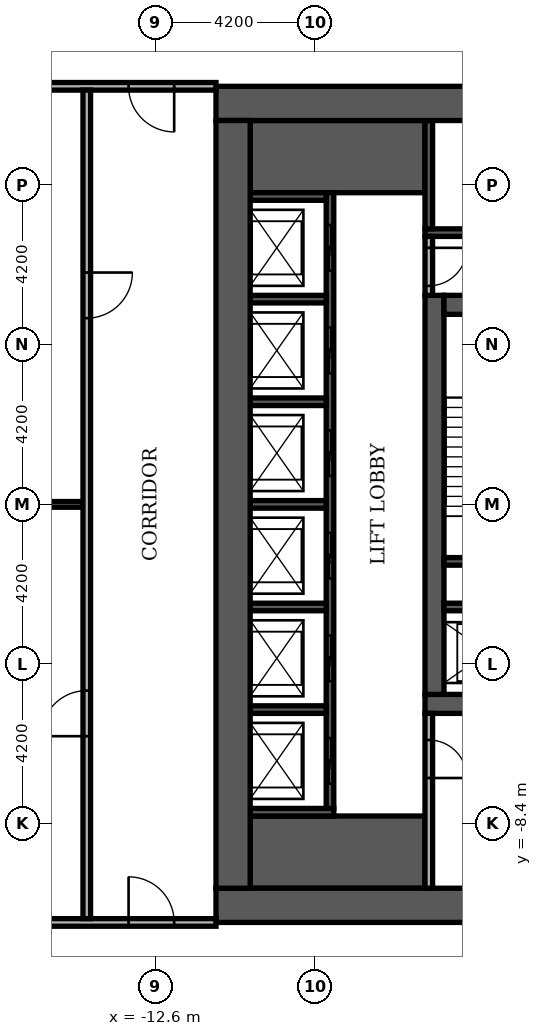
"""IFC4 building model, lengths in metres.
Left out: names, types, materials, properties, quantities, classifications, styles, units other than length and angle.
Written with IfcOpenShell. Run it as: python <this file> out.ifc"""

import sys

from ifc_helpers import new_model, si_unit, direction, frame, frame_2d, origin, place, context, subcontext, project, spatial, rectangle, extrude, element, fill, save


model = new_model("IFC4")
c1 = context("Model", 3, precision=1e-05, world=origin(), true_north=direction((0.0, 1.0)))
c2 = subcontext(c1, "Body", "Model", "MODEL_VIEW")
j1 = project(units=[si_unit("LENGTHUNIT", "METRE"), si_unit("PLANEANGLEUNIT", "RADIAN")], contexts=[c1])
p1 = place(None, origin())
s1 = spatial("IfcSite", under=j1, at=p1, CompositionType="ELEMENT")
p2 = place(p1, origin())
s2 = spatial("IfcBuilding", under=s1, at=p2, CompositionType="ELEMENT")
p3 = place(p2, frame((0.0, 0.0, -8.4)))
s3 = spatial("IfcBuildingStorey", under=s2, at=p3, CompositionType="ELEMENT", Elevation=-8.4)
p4 = place(p3, frame((-5.5, -5.25, 0.0), z_axis=(0.0, 0.0, 1.0), x_axis=(1.0, 0.0, 0.0)))
e1 = element("IfcWall", 1, at=p4, inside=s3, PredefinedType="SHEAR", context=c2, shape_type="SweptSolid", body=[
    extrude(rectangle(XDim=11.0, YDim=0.5, at=frame_2d((5.5, 0.0))), origin(), (0.0, 0.0, 1.0), 3.85),
])
p5 = place(p4, frame((4.9, 0.0, 0.0)))
e2 = element("IfcOpeningElement", 2, at=p5, cuts=e1, PredefinedType="OPENING", context=c2, shape_type="SweptSolid", body=[
    extrude(rectangle(XDim=1.2, YDim=2.1, at=frame_2d((0.6, 1.05))), frame((0.0, 0.26, 0.0), z_axis=(0.0, -1.0, 0.0), x_axis=(1.0, 0.0, 0.0)), (0.0, 0.0, 1.0), 0.52),
])
p6 = place(p3, frame((-5.25, -5.0, 0.0), z_axis=(0.0, 0.0, 1.0), x_axis=(0.0, 1.0, 0.0)))
e3 = element("IfcWall", 3, at=p6, inside=s3, PredefinedType="SHEAR", context=c2, shape_type="SweptSolid", body=[
    extrude(rectangle(XDim=10.5, YDim=0.5, at=frame_2d((5.25, 0.0))), origin(), (0.0, 0.0, 1.0), 3.85),
])
p7 = place(p3, frame((-5.0, 5.25, 0.0), z_axis=(0.0, 0.0, 1.0), x_axis=(1.0, 0.0, 0.0)))
e4 = element("IfcWall", 4, at=p7, inside=s3, PredefinedType="SHEAR", context=c2, shape_type="SweptSolid", body=[
    extrude(rectangle(XDim=10.0, YDim=0.5, at=frame_2d((5.0, 0.0))), origin(), (0.0, 0.0, 1.0), 3.85),
])
p8 = place(p7, frame((4.4, 0.0, 0.0)))
e5 = element("IfcOpeningElement", 5, at=p8, cuts=e4, PredefinedType="OPENING", context=c2, shape_type="SweptSolid", body=[
    extrude(rectangle(XDim=1.2, YDim=2.1, at=frame_2d((0.6, 1.05))), frame((0.0, 0.26, 0.0), z_axis=(0.0, -1.0, 0.0), x_axis=(1.0, 0.0, 0.0)), (0.0, 0.0, 1.0), 0.52),
])
for number, where, z_axis, x_axis in (
    (6, (-10.1, -9.15, 0.0), (0.0, 0.0, 1.0), (1.0, 0.0, 0.0)),
    (7, (-10.1, 9.15, 0.0), (0.0, 0.0, 1.0), (1.0, 0.0, 0.0)),
):
    element("IfcWall", number, at=place(p3, frame(where, z_axis=z_axis, x_axis=x_axis)), inside=s3, PredefinedType="SHEAR", context=c2, shape_type="SweptSolid", body=[
        extrude(rectangle(XDim=4.6, YDim=1.9, at=frame_2d((2.3, 0.0))), origin(), (0.0, 0.0, 1.0), 3.85),
    ])
p9 = place(p3, frame((-5.0, -1.5, 0.0), z_axis=(0.0, 0.0, 1.0), x_axis=(1.0, 0.0, 0.0)))
e8 = element("IfcWall", 8, at=p9, inside=s3, PredefinedType="SHEAR", context=c2, shape_type="SweptSolid", body=[
    extrude(rectangle(XDim=3.05, YDim=0.2, at=frame_2d((1.525, 0.0))), origin(), (0.0, 0.0, 1.0), 3.85),
])
p10 = place(p3, frame((-5.5, 7.15, 0.0), z_axis=(0.0, 0.0, 1.0), x_axis=(1.0, 0.0, 0.0)))
e9 = element("IfcWall", 9, at=p10, inside=s3, PredefinedType="SHEAR", context=c2, shape_type="SweptSolid", body=[
    extrude(rectangle(XDim=6.8, YDim=0.2, at=frame_2d((3.4, 0.0))), origin(), (0.0, 0.0, 1.0), 3.85),
])
p11 = place(p3, frame((-5.4, 7.25, 0.0), z_axis=(0.0, 0.0, 1.0), x_axis=(0.0, 1.0, 0.0)))
e10 = element("IfcWall", 10, at=p11, inside=s3, PredefinedType="SHEAR", context=c2, shape_type="SweptSolid", body=[
    extrude(rectangle(XDim=2.85, YDim=0.2, at=frame_2d((1.425, 0.0))), origin(), (0.0, 0.0, 1.0), 3.85),
])
p12 = place(p3, frame((-10.1, -8.1, 0.0), z_axis=(0.0, 0.0, 1.0), x_axis=(1.0, 0.0, 0.0)))
e11 = element("IfcWall", 11, at=p12, inside=s3, PredefinedType="SHEAR", context=c2, shape_type="SweptSolid", body=[
    extrude(rectangle(XDim=2.2, YDim=0.2, at=frame_2d((1.1, 0.0))), origin(), (0.0, 0.0, 1.0), 3.85),
])
p13 = place(p3, frame((-8.0, -8.0, 0.0), z_axis=(0.0, 0.0, 1.0), x_axis=(0.0, 1.0, 0.0)))
e12 = element("IfcWall", 12, at=p13, inside=s3, PredefinedType="SHEAR", context=c2, shape_type="SweptSolid", body=[
    extrude(rectangle(XDim=16.2, YDim=0.2, at=frame_2d((8.1, 0.0))), origin(), (0.0, 0.0, 1.0), 3.85),
])
p14 = place(p13, frame((0.65, 0.0, 0.0)))
e13 = element("IfcOpeningElement", 13, at=p14, cuts=e12, PredefinedType="OPENING", context=c2, shape_type="SweptSolid", body=[
    extrude(rectangle(XDim=1.2, YDim=2.1, at=frame_2d((0.6, 1.05))), frame((0.0, 0.11, 0.0), z_axis=(0.0, -1.0, 0.0), x_axis=(1.0, 0.0, 0.0)), (0.0, 0.0, 1.0), 0.22),
])
p15 = place(p13, frame((3.35, 0.0, 0.0)))
e14 = element("IfcOpeningElement", 14, at=p15, cuts=e12, PredefinedType="OPENING", context=c2, shape_type="SweptSolid", body=[
    extrude(rectangle(XDim=1.2, YDim=2.1, at=frame_2d((0.6, 1.05))), frame((0.0, 0.11, 0.0), z_axis=(0.0, -1.0, 0.0), x_axis=(1.0, 0.0, 0.0)), (0.0, 0.0, 1.0), 0.22),
])
p16 = place(p13, frame((6.05, 0.0, 0.0)))
e15 = element("IfcOpeningElement", 15, at=p16, cuts=e12, PredefinedType="OPENING", context=c2, shape_type="SweptSolid", body=[
    extrude(rectangle(XDim=1.2, YDim=2.1, at=frame_2d((0.6, 1.05))), frame((0.0, 0.11, 0.0), z_axis=(0.0, -1.0, 0.0), x_axis=(1.0, 0.0, 0.0)), (0.0, 0.0, 1.0), 0.22),
])
p17 = place(p13, frame((8.75, 0.0, 0.0)))
e16 = element("IfcOpeningElement", 16, at=p17, cuts=e12, PredefinedType="OPENING", context=c2, shape_type="SweptSolid", body=[
    extrude(rectangle(XDim=1.2, YDim=2.1, at=frame_2d((0.6, 1.05))), frame((0.0, 0.11, 0.0), z_axis=(0.0, -1.0, 0.0), x_axis=(1.0, 0.0, 0.0)), (0.0, 0.0, 1.0), 0.22),
])
p18 = place(p13, frame((11.45, 0.0, 0.0)))
e17 = element("IfcOpeningElement", 17, at=p18, cuts=e12, PredefinedType="OPENING", context=c2, shape_type="SweptSolid", body=[
    extrude(rectangle(XDim=1.2, YDim=2.1, at=frame_2d((0.6, 1.05))), frame((0.0, 0.11, 0.0), z_axis=(0.0, -1.0, 0.0), x_axis=(1.0, 0.0, 0.0)), (0.0, 0.0, 1.0), 0.22),
])
p19 = place(p13, frame((14.15, 0.0, 0.0)))
e18 = element("IfcOpeningElement", 18, at=p19, cuts=e12, PredefinedType="OPENING", context=c2, shape_type="SweptSolid", body=[
    extrude(rectangle(XDim=1.2, YDim=2.1, at=frame_2d((0.6, 1.05))), frame((0.0, 0.11, 0.0), z_axis=(0.0, -1.0, 0.0), x_axis=(1.0, 0.0, 0.0)), (0.0, 0.0, 1.0), 0.22),
])
for number, where, z_axis, x_axis in (
    (19, (-10.1, -5.4, 0.0), (0.0, 0.0, 1.0), (1.0, 0.0, 0.0)),
    (20, (-10.1, -2.7, 0.0), (0.0, 0.0, 1.0), (1.0, 0.0, 0.0)),
):
    element("IfcWall", number, at=place(p3, frame(where, z_axis=z_axis, x_axis=x_axis)), inside=s3, PredefinedType="SHEAR", context=c2, shape_type="SweptSolid", body=[
        extrude(rectangle(XDim=2.0, YDim=0.2, at=frame_2d((1.0, 0.0))), origin(), (0.0, 0.0, 1.0), 3.85),
    ])
p20 = place(p3, frame((-5.0, -2.7, 0.0), z_axis=(0.0, 0.0, 1.0), x_axis=(1.0, 0.0, 0.0)))
e21 = element("IfcWall", 21, at=p20, inside=s3, PredefinedType="SHEAR", context=c2, shape_type="SweptSolid", body=[
    extrude(rectangle(XDim=2.85, YDim=0.2, at=frame_2d((1.425, 0.0))), origin(), (0.0, 0.0, 1.0), 3.85),
])
for number, where, z_axis, x_axis in (
    (22, (-10.1, 0.0, 0.0), (0.0, 0.0, 1.0), (1.0, 0.0, 0.0)),
    (23, (-10.1, 2.7, 0.0), (0.0, 0.0, 1.0), (1.0, 0.0, 0.0)),
    (24, (-10.1, 5.4, 0.0), (0.0, 0.0, 1.0), (1.0, 0.0, 0.0)),
    (25, (-10.1, 8.1, 0.0), (0.0, 0.0, 1.0), (1.0, 0.0, 0.0)),
):
    element("IfcWall", number, at=place(p3, frame(where, z_axis=z_axis, x_axis=x_axis)), inside=s3, PredefinedType="SHEAR", context=c2, shape_type="SweptSolid", body=[
        extrude(rectangle(XDim=2.0, YDim=0.2, at=frame_2d((1.0, 0.0))), origin(), (0.0, 0.0, 1.0), 3.85),
    ])
p21 = place(p3, frame((-11.0, -10.55, 0.0), z_axis=(0.0, 0.0, 1.0), x_axis=(1.0, 0.0, 0.0)))
e26 = element("IfcWall", 26, at=p21, inside=s3, PredefinedType="SHEAR", context=c2, shape_type="SweptSolid", body=[
    extrude(rectangle(XDim=22.0, YDim=0.9, at=frame_2d((11.0, 0.0))), origin(), (0.0, 0.0, 1.0), 3.85),
])
p22 = place(p21, frame((7.4, 0.0, 0.0)))
e27 = element("IfcOpeningElement", 27, at=p22, cuts=e26, PredefinedType="OPENING", context=c2, shape_type="SweptSolid", body=[
    extrude(rectangle(XDim=1.8, YDim=2.2, at=frame_2d((0.9, 1.1))), frame((0.0, 0.46, 0.0), z_axis=(0.0, -1.0, 0.0), x_axis=(1.0, 0.0, 0.0)), (0.0, 0.0, 1.0), 0.92),
])
p23 = place(p3, frame((-11.0, 10.55, 0.0), z_axis=(0.0, 0.0, 1.0), x_axis=(1.0, 0.0, 0.0)))
e28 = element("IfcWall", 28, at=p23, inside=s3, PredefinedType="SHEAR", context=c2, shape_type="SweptSolid", body=[
    extrude(rectangle(XDim=22.0, YDim=0.9, at=frame_2d((11.0, 0.0))), origin(), (0.0, 0.0, 1.0), 3.85),
])
p24 = place(p23, frame((13.3, 0.0, 0.0)))
e29 = element("IfcOpeningElement", 29, at=p24, cuts=e28, PredefinedType="OPENING", context=c2, shape_type="SweptSolid", body=[
    extrude(rectangle(XDim=1.8, YDim=2.2, at=frame_2d((0.9, 1.1))), frame((0.0, 0.46, 0.0), z_axis=(0.0, -1.0, 0.0), x_axis=(1.0, 0.0, 0.0)), (0.0, 0.0, 1.0), 0.92),
])
p25 = place(p3, frame((-10.55, -10.1, 0.0), z_axis=(0.0, 0.0, 1.0), x_axis=(0.0, 1.0, 0.0)))
e30 = element("IfcWall", 30, at=p25, inside=s3, PredefinedType="SHEAR", context=c2, shape_type="SweptSolid", body=[
    extrude(rectangle(XDim=20.2, YDim=0.9, at=frame_2d((10.1, 0.0))), origin(), (0.0, 0.0, 1.0), 3.85),
])
p26 = place(p3, frame((-5.4, -10.1, 0.0), z_axis=(0.0, 0.0, 1.0), x_axis=(0.0, 1.0, 0.0)))
e31 = element("IfcWall", 31, at=p26, inside=s3, PredefinedType="PARTITIONING", context=c2, shape_type="SweptSolid", body=[
    extrude(rectangle(XDim=4.6, YDim=0.2, at=frame_2d((2.3, 0.0))), origin(), (0.0, 0.0, 1.0), 3.85),
])
p27 = place(p26, frame((2.9, 0.0, 0.0)))
e32 = element("IfcOpeningElement", 32, at=p27, cuts=e31, PredefinedType="OPENING", context=c2, shape_type="SweptSolid", body=[
    extrude(rectangle(XDim=1.0, YDim=2.1, at=frame_2d((0.5, 1.05))), frame((0.0, 0.11, 0.0), z_axis=(0.0, -1.0, 0.0), x_axis=(1.0, 0.0, 0.0)), (0.0, 0.0, 1.0), 0.22),
])
p28 = place(p3, frame((-5.4, 5.5, 0.0), z_axis=(0.0, 0.0, 1.0), x_axis=(0.0, 1.0, 0.0)))
e33 = element("IfcWall", 33, at=p28, inside=s3, PredefinedType="PARTITIONING", context=c2, shape_type="SweptSolid", body=[
    extrude(rectangle(XDim=1.55, YDim=0.2, at=frame_2d((0.775, 0.0))), origin(), (0.0, 0.0, 1.0), 3.85),
])
p29 = place(p28, frame((0.25, 0.0, 0.0)))
e34 = element("IfcOpeningElement", 34, at=p29, cuts=e33, PredefinedType="OPENING", context=c2, shape_type="SweptSolid", body=[
    extrude(rectangle(XDim=1.0, YDim=2.1, at=frame_2d((0.5, 1.05))), frame((0.0, 0.11, 0.0), z_axis=(0.0, -1.0, 0.0), x_axis=(1.0, 0.0, 0.0)), (0.0, 0.0, 1.0), 0.22),
])
p30 = place(p3, frame((-25.3, -11.0, 0.0), z_axis=(0.0, 0.0, 1.0), x_axis=(1.0, 0.0, 0.0)))
e35 = element("IfcWall", 35, at=p30, inside=s3, PredefinedType="PARTITIONING", context=c2, shape_type="SweptSolid", body=[
    extrude(rectangle(XDim=14.3, YDim=0.2, at=frame_2d((7.15, 0.0))), origin(), (0.0, 0.0, 1.0), 3.85),
])
p31 = place(p30, frame((12.0, 0.0, 0.0)))
e36 = element("IfcOpeningElement", 36, at=p31, cuts=e35, PredefinedType="OPENING", context=c2, shape_type="SweptSolid", body=[
    extrude(rectangle(XDim=1.2, YDim=2.2, at=frame_2d((0.6, 1.1))), frame((0.0, 0.11, 0.0), z_axis=(0.0, -1.0, 0.0), x_axis=(1.0, 0.0, 0.0)), (0.0, 0.0, 1.0), 0.22),
])
p32 = place(p3, frame((-16.2, 0.0, 0.0), z_axis=(0.0, 0.0, 1.0), x_axis=(1.0, 0.0, 0.0)))
e37 = element("IfcWall", 37, at=p32, inside=s3, PredefinedType="PARTITIONING", context=c2, shape_type="SweptSolid", body=[
    extrude(rectangle(XDim=1.7, YDim=0.15, at=frame_2d((0.85, 0.0))), origin(), (0.0, 0.0, 1.0), 3.85),
])
p33 = place(p3, frame((-25.3, 11.0, 0.0), z_axis=(0.0, 0.0, 1.0), x_axis=(1.0, 0.0, 0.0)))
e38 = element("IfcWall", 38, at=p33, inside=s3, PredefinedType="PARTITIONING", context=c2, shape_type="SweptSolid", body=[
    extrude(rectangle(XDim=14.3, YDim=0.2, at=frame_2d((7.15, 0.0))), origin(), (0.0, 0.0, 1.0), 3.85),
])
p34 = place(p33, frame((12.0, 0.0, 0.0)))
e39 = element("IfcOpeningElement", 39, at=p34, cuts=e38, PredefinedType="OPENING", context=c2, shape_type="SweptSolid", body=[
    extrude(rectangle(XDim=1.2, YDim=2.2, at=frame_2d((0.6, 1.1))), frame((0.0, 0.11, 0.0), z_axis=(0.0, -1.0, 0.0), x_axis=(1.0, 0.0, 0.0)), (0.0, 0.0, 1.0), 0.22),
])
p35 = place(p3, frame((-14.4, -10.9, 0.0), z_axis=(0.0, 0.0, 1.0), x_axis=(0.0, 1.0, 0.0)))
e40 = element("IfcWall", 40, at=p35, inside=s3, PredefinedType="PARTITIONING", context=c2, shape_type="SweptSolid", body=[
    extrude(rectangle(XDim=21.8, YDim=0.2, at=frame_2d((10.9, 0.0))), origin(), (0.0, 0.0, 1.0), 3.85),
])
p36 = place(p35, frame((4.8, 0.0, 0.0)))
e41 = element("IfcOpeningElement", 41, at=p36, cuts=e40, PredefinedType="OPENING", context=c2, shape_type="SweptSolid", body=[
    extrude(rectangle(XDim=1.2, YDim=2.2, at=frame_2d((0.6, 1.1))), frame((0.0, 0.11, 0.0), z_axis=(0.0, -1.0, 0.0), x_axis=(1.0, 0.0, 0.0)), (0.0, 0.0, 1.0), 0.22),
])
p37 = place(p35, frame((15.8, 0.0, 0.0)))
e42 = element("IfcOpeningElement", 42, at=p37, cuts=e40, PredefinedType="OPENING", context=c2, shape_type="SweptSolid", body=[
    extrude(rectangle(XDim=1.2, YDim=2.2, at=frame_2d((0.6, 1.1))), frame((0.0, 0.11, 0.0), z_axis=(0.0, -1.0, 0.0), x_axis=(1.0, 0.0, 0.0)), (0.0, 0.0, 1.0), 0.22),
])
p38 = place(p14, origin())
e43 = element("IfcDoor", 43, at=p38, inside=s3, OperationType="SLIDING_TO_LEFT", PredefinedType="DOOR", context=c2, shape_type="SweptSolid", body=[
    extrude(rectangle(XDim=1.2, YDim=2.1, at=frame_2d((0.6, 1.05))), frame((0.0, 0.025, 0.0), z_axis=(0.0, -1.0, 0.0), x_axis=(1.0, 0.0, 0.0)), (0.0, 0.0, 1.0), 0.05),
])
fill(e13, e43)
p39 = place(p15, origin())
e44 = element("IfcDoor", 44, at=p39, inside=s3, OperationType="SLIDING_TO_LEFT", PredefinedType="DOOR", context=c2, shape_type="SweptSolid", body=[
    extrude(rectangle(XDim=1.2, YDim=2.1, at=frame_2d((0.6, 1.05))), frame((0.0, 0.025, 0.0), z_axis=(0.0, -1.0, 0.0), x_axis=(1.0, 0.0, 0.0)), (0.0, 0.0, 1.0), 0.05),
])
fill(e14, e44)
p40 = place(p16, origin())
e45 = element("IfcDoor", 45, at=p40, inside=s3, OperationType="SLIDING_TO_LEFT", PredefinedType="DOOR", context=c2, shape_type="SweptSolid", body=[
    extrude(rectangle(XDim=1.2, YDim=2.1, at=frame_2d((0.6, 1.05))), frame((0.0, 0.025, 0.0), z_axis=(0.0, -1.0, 0.0), x_axis=(1.0, 0.0, 0.0)), (0.0, 0.0, 1.0), 0.05),
])
fill(e15, e45)
p41 = place(p17, origin())
e46 = element("IfcDoor", 46, at=p41, inside=s3, OperationType="SLIDING_TO_LEFT", PredefinedType="DOOR", context=c2, shape_type="SweptSolid", body=[
    extrude(rectangle(XDim=1.2, YDim=2.1, at=frame_2d((0.6, 1.05))), frame((0.0, 0.025, 0.0), z_axis=(0.0, -1.0, 0.0), x_axis=(1.0, 0.0, 0.0)), (0.0, 0.0, 1.0), 0.05),
])
fill(e16, e46)
p42 = place(p18, origin())
e47 = element("IfcDoor", 47, at=p42, inside=s3, OperationType="SLIDING_TO_LEFT", PredefinedType="DOOR", context=c2, shape_type="SweptSolid", body=[
    extrude(rectangle(XDim=1.2, YDim=2.1, at=frame_2d((0.6, 1.05))), frame((0.0, 0.025, 0.0), z_axis=(0.0, -1.0, 0.0), x_axis=(1.0, 0.0, 0.0)), (0.0, 0.0, 1.0), 0.05),
])
fill(e17, e47)
p43 = place(p19, origin())
e48 = element("IfcDoor", 48, at=p43, inside=s3, OperationType="SLIDING_TO_LEFT", PredefinedType="DOOR", context=c2, shape_type="SweptSolid", body=[
    extrude(rectangle(XDim=1.2, YDim=2.1, at=frame_2d((0.6, 1.05))), frame((0.0, 0.025, 0.0), z_axis=(0.0, -1.0, 0.0), x_axis=(1.0, 0.0, 0.0)), (0.0, 0.0, 1.0), 0.05),
])
fill(e18, e48)
p44 = place(p29, frame((1.0, 0.0, 0.0), z_axis=(0.0, 0.0, 1.0), x_axis=(-1.0, 0.0, 0.0)))
e49 = element("IfcDoor", 49, at=p44, inside=s3, OperationType="SINGLE_SWING_RIGHT", PredefinedType="DOOR", context=c2, shape_type="SweptSolid", body=[
    extrude(rectangle(XDim=1.0, YDim=2.1, at=frame_2d((0.5, 1.05))), frame((0.0, 0.025, 0.0), z_axis=(0.0, -1.0, 0.0), x_axis=(1.0, 0.0, 0.0)), (0.0, 0.0, 1.0), 0.05),
])
fill(e34, e49)
p45 = place(p27, frame((1.0, 0.0, 0.0), z_axis=(0.0, 0.0, 1.0), x_axis=(-1.0, 0.0, 0.0)))
e50 = element("IfcDoor", 50, at=p45, inside=s3, OperationType="SINGLE_SWING_LEFT", PredefinedType="DOOR", context=c2, shape_type="SweptSolid", body=[
    extrude(rectangle(XDim=1.0, YDim=2.1, at=frame_2d((0.5, 1.05))), frame((0.0, 0.025, 0.0), z_axis=(0.0, -1.0, 0.0), x_axis=(1.0, 0.0, 0.0)), (0.0, 0.0, 1.0), 0.05),
])
fill(e32, e50)
p46 = place(p31, origin())
e51 = element("IfcDoor", 51, at=p46, inside=s3, OperationType="SINGLE_SWING_LEFT", PredefinedType="DOOR", context=c2, shape_type="SweptSolid", body=[
    extrude(rectangle(XDim=1.2, YDim=2.2, at=frame_2d((0.6, 1.1))), frame((0.0, 0.025, 0.0), z_axis=(0.0, -1.0, 0.0), x_axis=(1.0, 0.0, 0.0)), (0.0, 0.0, 1.0), 0.05),
])
fill(e36, e51)
p47 = place(p36, origin())
e52 = element("IfcDoor", 52, at=p47, inside=s3, OperationType="SINGLE_SWING_LEFT", PredefinedType="DOOR", context=c2, shape_type="SweptSolid", body=[
    extrude(rectangle(XDim=1.2, YDim=2.2, at=frame_2d((0.6, 1.1))), frame((0.0, 0.025, 0.0), z_axis=(0.0, -1.0, 0.0), x_axis=(1.0, 0.0, 0.0)), (0.0, 0.0, 1.0), 0.05),
])
fill(e41, e52)
p48 = place(p37, origin())
e53 = element("IfcDoor", 53, at=p48, inside=s3, OperationType="SINGLE_SWING_RIGHT", PredefinedType="DOOR", context=c2, shape_type="SweptSolid", body=[
    extrude(rectangle(XDim=1.2, YDim=2.2, at=frame_2d((0.6, 1.1))), frame((0.0, 0.025, 0.0), z_axis=(0.0, -1.0, 0.0), x_axis=(1.0, 0.0, 0.0)), (0.0, 0.0, 1.0), 0.05),
])
fill(e42, e53)
p49 = place(p34, origin())
e54 = element("IfcDoor", 54, at=p49, inside=s3, OperationType="SINGLE_SWING_RIGHT", PredefinedType="DOOR", context=c2, shape_type="SweptSolid", body=[
    extrude(rectangle(XDim=1.2, YDim=2.2, at=frame_2d((0.6, 1.1))), frame((0.0, 0.025, 0.0), z_axis=(0.0, -1.0, 0.0), x_axis=(1.0, 0.0, 0.0)), (0.0, 0.0, 1.0), 0.05),
])
fill(e39, e54)
save(model, sys.argv[1])
